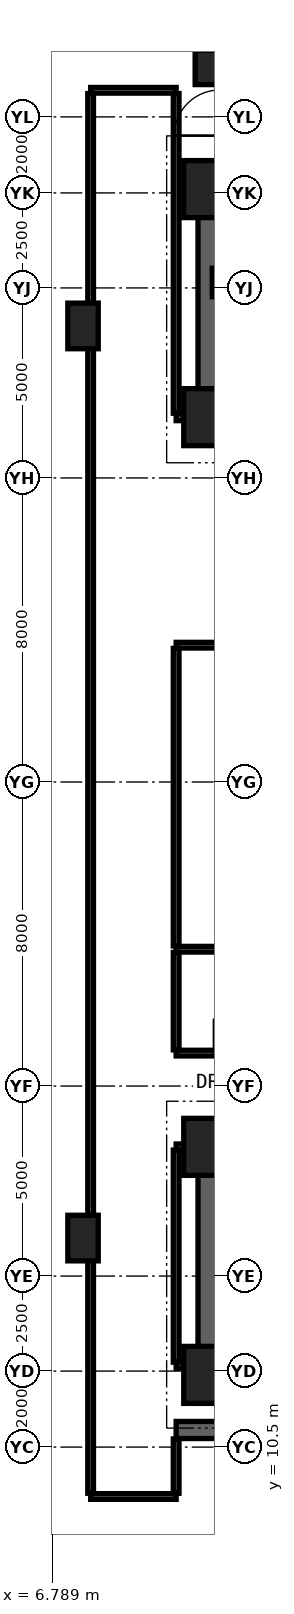
"""IFC4 building model, lengths in metres.
Left out: names, types, materials, properties, quantities, classifications, styles, units other than length and angle.
Written with IfcOpenShell. Run it as: python <this file> out.ifc"""

import sys

from ifc_helpers import new_model, si_unit, direction, frame, frame_2d, origin, origin_2d, place, context, subcontext, project, spatial, rectangle, extrude, element, fill, save


model = new_model("IFC4")
c1 = context("Model", 3, precision=1e-05, world=origin(), true_north=direction((0.0, 1.0)))
c2 = subcontext(c1, "Body", "Model", "MODEL_VIEW")
j1 = project(units=[si_unit("LENGTHUNIT", "METRE"), si_unit("PLANEANGLEUNIT", "RADIAN")], contexts=[c1])
p1 = place(None, origin())
s1 = spatial("IfcSite", under=j1, at=p1, CompositionType="ELEMENT")
p2 = place(p1, origin())
s2 = spatial("IfcBuilding", under=s1, at=p2, CompositionType="ELEMENT")
p3 = place(p2, frame((0.0, 0.0, 9.5)))
s3 = spatial("IfcBuildingStorey", under=s2, at=p3, CompositionType="ELEMENT", Elevation=9.5)
for number, where, z_axis, x_axis in (
    (1, (11.0, 12.4, 0.0), (0.0, 0.0, 1.0), (1.0, 0.0, 0.0)),
    (2, (11.0, 18.4, 0.0), (0.0, 0.0, 1.0), (1.0, 0.0, 0.0)),
    (3, (11.0, 37.6, 0.0), (0.0, 0.0, 1.0), (1.0, 0.0, 0.0)),
    (4, (11.0, 43.6, 0.0), (0.0, 0.0, 1.0), (1.0, 0.0, 0.0)),
):
    element("IfcColumn", number, at=place(p3, frame(where, z_axis=z_axis, x_axis=x_axis)), inside=s3, PredefinedType="COLUMN", context=c2, shape_type="SweptSolid", body=[
        extrude(rectangle(XDim=1.5, YDim=1.5, at=origin_2d()), origin(), (0.0, 0.0, 1.0), 4.3),
    ])
for number, where, z_axis, x_axis in (
    (5, (7.6, 16.0, 0.0), (0.0, 0.0, 1.0), (1.0, 0.0, 0.0)),
    (6, (7.6, 40.0, 0.0), (0.0, 0.0, 1.0), (1.0, 0.0, 0.0)),
):
    element("IfcColumn", number, at=place(p3, frame(where, z_axis=z_axis, x_axis=x_axis)), inside=s3, PredefinedType="PILASTER", context=c2, shape_type="SweptSolid", body=[
        extrude(rectangle(XDim=0.8, YDim=1.2, at=origin_2d()), origin(), (0.0, 0.0, 1.0), 4.3),
    ])
p4 = place(p3, frame((11.0, 43.6, 0.0), z_axis=(0.0, 0.0, 1.0), x_axis=(1.0, 0.0, 0.0)))
e7 = element("IfcWall", 7, at=p4, inside=s3, PredefinedType="SHEAR", context=c2, shape_type="SweptSolid", body=[
    extrude(rectangle(XDim=19.0, YDim=0.75, at=frame_2d((9.5, 0.0))), origin(), (0.0, 0.0, 1.0), 3.98),
])
p5 = place(p3, frame((11.0, 37.6, 0.0), z_axis=(0.0, 0.0, 1.0), x_axis=(0.0, 1.0, 0.0)))
e8 = element("IfcWall", 8, at=p5, inside=s3, PredefinedType="SHEAR", context=c2, shape_type="SweptSolid", body=[
    extrude(rectangle(XDim=6.0, YDim=0.75, at=frame_2d((3.0, 0.0))), origin(), (0.0, 0.0, 1.0), 3.98),
])
p6 = place(p3, frame((11.0, 37.6, 0.0), z_axis=(0.0, 0.0, 1.0), x_axis=(1.0, 0.0, 0.0)))
e9 = element("IfcWall", 9, at=p6, inside=s3, PredefinedType="SHEAR", context=c2, shape_type="SweptSolid", body=[
    extrude(rectangle(XDim=19.0, YDim=0.75, at=frame_2d((9.5, 0.0))), origin(), (0.0, 0.0, 1.0), 3.98),
])
p7 = place(p6, frame((1.07, 0.0, 0.0)))
e10 = element("IfcOpeningElement", 10, at=p7, cuts=e9, PredefinedType="OPENING", context=c2, shape_type="SweptSolid", body=[
    extrude(rectangle(XDim=1.15, YDim=2.2, at=frame_2d((0.575, 1.1))), frame((0.0, 0.385, 0.0), z_axis=(0.0, -1.0, 0.0), x_axis=(1.0, 0.0, 0.0)), (0.0, 0.0, 1.0), 0.77),
])
p8 = place(p6, frame((9.55, 0.0, 0.0)))
e11 = element("IfcOpeningElement", 11, at=p8, cuts=e9, PredefinedType="OPENING", context=c2, shape_type="SweptSolid", body=[
    extrude(rectangle(XDim=1.4, YDim=2.35, at=frame_2d((0.7, 1.175))), frame((0.0, 0.385, 0.0), z_axis=(0.0, -1.0, 0.0), x_axis=(1.0, 0.0, 0.0)), (0.0, 0.0, 1.0), 0.77),
])
p9 = place(p6, frame((11.95, 0.0, 0.0)))
e12 = element("IfcOpeningElement", 12, at=p9, cuts=e9, PredefinedType="OPENING", context=c2, shape_type="SweptSolid", body=[
    extrude(rectangle(XDim=1.4, YDim=2.35, at=frame_2d((0.7, 1.175))), frame((0.0, 0.385, 0.0), z_axis=(0.0, -1.0, 0.0), x_axis=(1.0, 0.0, 0.0)), (0.0, 0.0, 1.0), 0.77),
])
p10 = place(p6, frame((14.4, 0.0, 0.0)))
e13 = element("IfcOpeningElement", 13, at=p10, cuts=e9, PredefinedType="OPENING", context=c2, shape_type="SweptSolid", body=[
    extrude(rectangle(XDim=1.3, YDim=2.3, at=frame_2d((0.65, 1.15))), frame((0.0, 0.385, 0.0), z_axis=(0.0, -1.0, 0.0), x_axis=(1.0, 0.0, 0.0)), (0.0, 0.0, 1.0), 0.77),
])
p11 = place(p6, frame((16.6, 0.0, 0.0)))
e14 = element("IfcOpeningElement", 14, at=p11, cuts=e9, PredefinedType="OPENING", context=c2, shape_type="SweptSolid", body=[
    extrude(rectangle(XDim=1.3, YDim=2.3, at=frame_2d((0.65, 1.15))), frame((0.0, 0.385, 0.0), z_axis=(0.0, -1.0, 0.0), x_axis=(1.0, 0.0, 0.0)), (0.0, 0.0, 1.0), 0.77),
])
p12 = place(p3, frame((11.0, 41.143, 0.0), z_axis=(0.0, 0.0, 1.0), x_axis=(1.0, 0.0, 0.0)))
e15 = element("IfcWall", 15, at=p12, inside=s3, PredefinedType="SHEAR", context=c2, shape_type="SweptSolid", body=[
    extrude(rectangle(XDim=9.0, YDim=0.75, at=frame_2d((4.5, 0.0))), origin(), (0.0, 0.0, 1.0), 3.98),
])
p13 = place(p3, frame((11.0, 12.4, 0.0), z_axis=(0.0, 0.0, 1.0), x_axis=(1.0, 0.0, 0.0)))
e16 = element("IfcWall", 16, at=p13, inside=s3, PredefinedType="SHEAR", context=c2, shape_type="SweptSolid", body=[
    extrude(rectangle(XDim=19.0, YDim=0.75, at=frame_2d((9.5, 0.0))), origin(), (0.0, 0.0, 1.0), 3.98),
])
p14 = place(p3, frame((11.0, 12.4, 0.0), z_axis=(0.0, 0.0, 1.0), x_axis=(0.0, 1.0, 0.0)))
e17 = element("IfcWall", 17, at=p14, inside=s3, PredefinedType="SHEAR", context=c2, shape_type="SweptSolid", body=[
    extrude(rectangle(XDim=6.0, YDim=0.75, at=frame_2d((3.0, 0.0))), origin(), (0.0, 0.0, 1.0), 3.98),
])
p15 = place(p3, frame((11.0, 18.4, 0.0), z_axis=(0.0, 0.0, 1.0), x_axis=(1.0, 0.0, 0.0)))
e18 = element("IfcWall", 18, at=p15, inside=s3, PredefinedType="SHEAR", context=c2, shape_type="SweptSolid", body=[
    extrude(rectangle(XDim=19.0, YDim=0.75, at=frame_2d((9.5, 0.0))), origin(), (0.0, 0.0, 1.0), 3.98),
])
p16 = place(p15, frame((4.175, 0.0, 0.0)))
e19 = element("IfcOpeningElement", 19, at=p16, cuts=e18, PredefinedType="OPENING", context=c2, shape_type="SweptSolid", body=[
    extrude(rectangle(XDim=1.2, YDim=2.25, at=frame_2d((0.6, 1.125))), frame((0.0, 0.385, 0.0), z_axis=(0.0, -1.0, 0.0), x_axis=(1.0, 0.0, 0.0)), (0.0, 0.0, 1.0), 0.77),
])
p17 = place(p15, frame((9.6, 0.0, 0.0)))
e20 = element("IfcOpeningElement", 20, at=p17, cuts=e18, PredefinedType="OPENING", context=c2, shape_type="SweptSolid", body=[
    extrude(rectangle(XDim=1.3, YDim=2.3, at=frame_2d((0.65, 1.15))), frame((0.0, 0.385, 0.0), z_axis=(0.0, -1.0, 0.0), x_axis=(1.0, 0.0, 0.0)), (0.0, 0.0, 1.0), 0.77),
])
p18 = place(p15, frame((11.9, 0.0, 0.0)))
e21 = element("IfcOpeningElement", 21, at=p18, cuts=e18, PredefinedType="OPENING", context=c2, shape_type="SweptSolid", body=[
    extrude(rectangle(XDim=1.3, YDim=2.3, at=frame_2d((0.65, 1.15))), frame((0.0, 0.385, 0.0), z_axis=(0.0, -1.0, 0.0), x_axis=(1.0, 0.0, 0.0)), (0.0, 0.0, 1.0), 0.77),
])
p19 = place(p15, frame((14.3, 0.0, 0.0)))
e22 = element("IfcOpeningElement", 22, at=p19, cuts=e18, PredefinedType="OPENING", context=c2, shape_type="SweptSolid", body=[
    extrude(rectangle(XDim=1.3, YDim=2.3, at=frame_2d((0.65, 1.15))), frame((0.0, 0.385, 0.0), z_axis=(0.0, -1.0, 0.0), x_axis=(1.0, 0.0, 0.0)), (0.0, 0.0, 1.0), 0.77),
])
p20 = place(p15, frame((16.6, 0.0, 0.0)))
e23 = element("IfcOpeningElement", 23, at=p20, cuts=e18, PredefinedType="OPENING", context=c2, shape_type="SweptSolid", body=[
    extrude(rectangle(XDim=1.3, YDim=2.3, at=frame_2d((0.65, 1.15))), frame((0.0, 0.385, 0.0), z_axis=(0.0, -1.0, 0.0), x_axis=(1.0, 0.0, 0.0)), (0.0, 0.0, 1.0), 0.77),
])
p21 = place(p3, frame((11.0, 46.8, 0.0), z_axis=(0.0, 0.0, 1.0), x_axis=(1.0, 0.0, 0.0)))
e24 = element("IfcColumn", 24, at=p21, inside=s3, PredefinedType="COLUMN", context=c2, shape_type="SweptSolid", body=[
    extrude(rectangle(XDim=0.9, YDim=0.9, at=origin_2d()), origin(), (0.0, 0.0, 1.0), 4.3),
])
p22 = place(p3, frame((7.8, 9.2, 0.0), z_axis=(0.0, 0.0, 1.0), x_axis=(1.0, 0.0, 0.0)))
e25 = element("IfcWall", 25, at=p22, inside=s3, PredefinedType="PARTITIONING", context=c2, shape_type="SweptSolid", body=[
    extrude(rectangle(XDim=2.25, YDim=0.15, at=frame_2d((1.125, 0.0))), origin(), (0.0, 0.0, 1.0), 3.98),
])
p23 = place(p3, frame((10.05, 10.95, 0.0), z_axis=(0.0, 0.0, 1.0), x_axis=(1.0, 0.0, 0.0)))
e26 = element("IfcWall", 26, at=p23, inside=s3, PredefinedType="SHEAR", context=c2, shape_type="SweptSolid", body=[
    extrude(rectangle(XDim=28.15, YDim=0.45, at=frame_2d((14.075, 0.0))), origin(), (0.0, 0.0, 1.0), 3.98),
])
p24 = place(p23, frame((11.72, 0.0, 0.0)))
e27 = element("IfcOpeningElement", 27, at=p24, cuts=e26, PredefinedType="OPENING", context=c2, shape_type="SweptSolid", body=[
    extrude(rectangle(XDim=1.15, YDim=2.2, at=frame_2d((0.575, 1.1))), frame((0.0, 0.235, 0.0), z_axis=(0.0, -1.0, 0.0), x_axis=(1.0, 0.0, 0.0)), (0.0, 0.0, 1.0), 0.47),
])
p25 = place(p23, frame((23.13, 0.0, 0.0)))
e28 = element("IfcOpeningElement", 28, at=p25, cuts=e26, PredefinedType="OPENING", context=c2, shape_type="SweptSolid", body=[
    extrude(rectangle(XDim=1.2, YDim=2.25, at=frame_2d((0.6, 1.125))), frame((0.0, 0.235, 0.0), z_axis=(0.0, -1.0, 0.0), x_axis=(1.0, 0.0, 0.0)), (0.0, 0.0, 1.0), 0.47),
])
p26 = place(p3, frame((10.05, 12.65, 0.0), z_axis=(0.0, 0.0, 1.0), x_axis=(1.0, 0.0, 0.0)))
e29 = element("IfcWall", 29, at=p26, inside=s3, PredefinedType="PARTITIONING", context=c2, shape_type="SweptSolid", body=[
    extrude(rectangle(XDim=0.58, YDim=0.15, at=frame_2d((0.29, 0.0))), origin(), (0.0, 0.0, 1.0), 3.98),
])
p27 = place(p3, frame((10.05, 18.4, 0.0), z_axis=(0.0, 0.0, 1.0), x_axis=(1.0, 0.0, 0.0)))
e30 = element("IfcWall", 30, at=p27, inside=s3, PredefinedType="PARTITIONING", context=c2, shape_type="SweptSolid", body=[
    extrude(rectangle(XDim=0.58, YDim=0.15, at=frame_2d((0.29, 0.0))), origin(), (0.0, 0.0, 1.0), 2.872),
])
p28 = place(p3, frame((10.05, 20.867, 0.0), z_axis=(0.0, 0.0, 1.0), x_axis=(1.0, 0.0, 0.0)))
e31 = element("IfcWall", 31, at=p28, inside=s3, PredefinedType="PARTITIONING", context=c2, shape_type="SweptSolid", body=[
    extrude(rectangle(XDim=30.35, YDim=0.15, at=frame_2d((15.175, 0.0))), origin(), (0.0, 0.0, 1.0), 2.932),
])
p29 = place(p28, frame((0.995, 0.0, 0.0)))
e32 = element("IfcOpeningElement", 32, at=p29, cuts=e31, PredefinedType="OPENING", context=c2, shape_type="SweptSolid", body=[
    extrude(rectangle(XDim=0.9, YDim=2.1, at=frame_2d((0.45, 1.05))), frame((0.0, 0.085, 0.0), z_axis=(0.0, -1.0, 0.0), x_axis=(1.0, 0.0, 0.0)), (0.0, 0.0, 1.0), 0.17),
])
p30 = place(p28, frame((16.5, 0.0, 0.0)))
e33 = element("IfcOpeningElement", 33, at=p30, cuts=e31, PredefinedType="OPENING", context=c2, shape_type="SweptSolid", body=[
    extrude(rectangle(XDim=1.2, YDim=2.25, at=frame_2d((0.6, 1.125))), frame((0.0, 0.085, 0.0), z_axis=(0.0, -1.0, 0.0), x_axis=(1.0, 0.0, 0.0)), (0.0, 0.0, 1.0), 0.17),
])
p31 = place(p3, frame((10.05, 23.6, 0.0), z_axis=(0.0, 0.0, 1.0), x_axis=(1.0, 0.0, 0.0)))
e34 = element("IfcWall", 34, at=p31, inside=s3, PredefinedType="PARTITIONING", context=c2, shape_type="SweptSolid", body=[
    extrude(rectangle(XDim=2.85, YDim=0.15, at=frame_2d((1.425, 0.0))), origin(), (0.0, 0.0, 1.0), 2.932),
])
p32 = place(p3, frame((10.05, 31.6, 0.0), z_axis=(0.0, 0.0, 1.0), x_axis=(1.0, 0.0, 0.0)))
e35 = element("IfcWall", 35, at=p32, inside=s3, PredefinedType="PARTITIONING", context=c2, shape_type="SweptSolid", body=[
    extrude(rectangle(XDim=4.43, YDim=0.15, at=frame_2d((2.215, 0.0))), origin(), (0.0, 0.0, 1.0), 2.932),
])
p33 = place(p3, frame((10.05, 37.6, 0.0), z_axis=(0.0, 0.0, 1.0), x_axis=(1.0, 0.0, 0.0)))
e36 = element("IfcWall", 36, at=p33, inside=s3, PredefinedType="SHEAR", context=c2, shape_type="SweptSolid", body=[
    extrude(rectangle(XDim=0.185, YDim=0.185, at=frame_2d((0.093, 0.0))), origin(), (0.0, 0.0, 1.0), 3.98),
])
p34 = place(p3, frame((7.8, 46.2, 0.0), z_axis=(0.0, 0.0, 1.0), x_axis=(1.0, 0.0, 0.0)))
e37 = element("IfcWall", 37, at=p34, inside=s3, PredefinedType="PARTITIONING", context=c2, shape_type="SweptSolid", body=[
    extrude(rectangle(XDim=2.25, YDim=0.15, at=frame_2d((1.125, 0.0))), origin(), (0.0, 0.0, 1.0), 3.98),
])
p35 = place(p3, frame((7.8, 9.285, 0.0), z_axis=(0.0, 0.0, 1.0), x_axis=(0.0, 1.0, 0.0)))
e38 = element("IfcWall", 38, at=p35, inside=s3, PredefinedType="PARTITIONING", context=c2, shape_type="SweptSolid", body=[
    extrude(rectangle(XDim=36.83, YDim=0.15, at=frame_2d((18.415, 0.0))), origin(), (0.0, 0.0, 1.0), 2.872),
])
p36 = place(p3, frame((10.05, 9.285, 0.0), z_axis=(0.0, 0.0, 1.0), x_axis=(0.0, 1.0, 0.0)))
e39 = element("IfcWall", 39, at=p36, inside=s3, PredefinedType="PARTITIONING", context=c2, shape_type="SweptSolid", body=[
    extrude(rectangle(XDim=1.43, YDim=0.15, at=frame_2d((0.715, 0.0))), origin(), (0.0, 0.0, 1.0), 3.98),
])
p37 = place(p3, frame((10.05, 12.735, 0.0), z_axis=(0.0, 0.0, 1.0), x_axis=(0.0, 1.0, 0.0)))
e40 = element("IfcWall", 40, at=p37, inside=s3, PredefinedType="PARTITIONING", context=c2, shape_type="SweptSolid", body=[
    extrude(rectangle(XDim=5.58, YDim=0.15, at=frame_2d((2.79, 0.0))), origin(), (0.0, 0.0, 1.0), 2.872),
])
p38 = place(p3, frame((10.05, 20.952, 0.0), z_axis=(0.0, 0.0, 1.0), x_axis=(0.0, 1.0, 0.0)))
e41 = element("IfcWall", 41, at=p38, inside=s3, PredefinedType="PARTITIONING", context=c2, shape_type="SweptSolid", body=[
    extrude(rectangle(XDim=2.563, YDim=0.15, at=frame_2d((1.282, 0.0))), origin(), (0.0, 0.0, 1.0), 3.98),
])
p39 = place(p3, frame((10.05, 23.685, 0.0), z_axis=(0.0, 0.0, 1.0), x_axis=(0.0, 1.0, 0.0)))
e42 = element("IfcWall", 42, at=p39, inside=s3, PredefinedType="PARTITIONING", context=c2, shape_type="SweptSolid", body=[
    extrude(rectangle(XDim=7.83, YDim=0.15, at=frame_2d((3.915, 0.0))), origin(), (0.0, 0.0, 1.0), 3.199),
])
p40 = place(p3, frame((10.05, 37.702, 0.0), z_axis=(0.0, 0.0, 1.0), x_axis=(0.0, 1.0, 0.0)))
e43 = element("IfcWall", 43, at=p40, inside=s3, PredefinedType="PARTITIONING", context=c2, shape_type="SweptSolid", body=[
    extrude(rectangle(XDim=8.413, YDim=0.15, at=frame_2d((4.206, 0.0))), origin(), (0.0, 0.0, 1.0), 2.872),
])
p41 = place(p29, origin())
e44 = element("IfcDoor", 44, at=p41, inside=s3, OperationType="SINGLE_SWING_LEFT", PredefinedType="DOOR", context=c2, shape_type="SweptSolid", body=[
    extrude(rectangle(XDim=0.9, YDim=2.1, at=frame_2d((0.45, 1.05))), frame((0.0, 0.025, 0.0), z_axis=(0.0, -1.0, 0.0), x_axis=(1.0, 0.0, 0.0)), (0.0, 0.0, 1.0), 0.05),
])
fill(e32, e44)
save(model, sys.argv[1])
